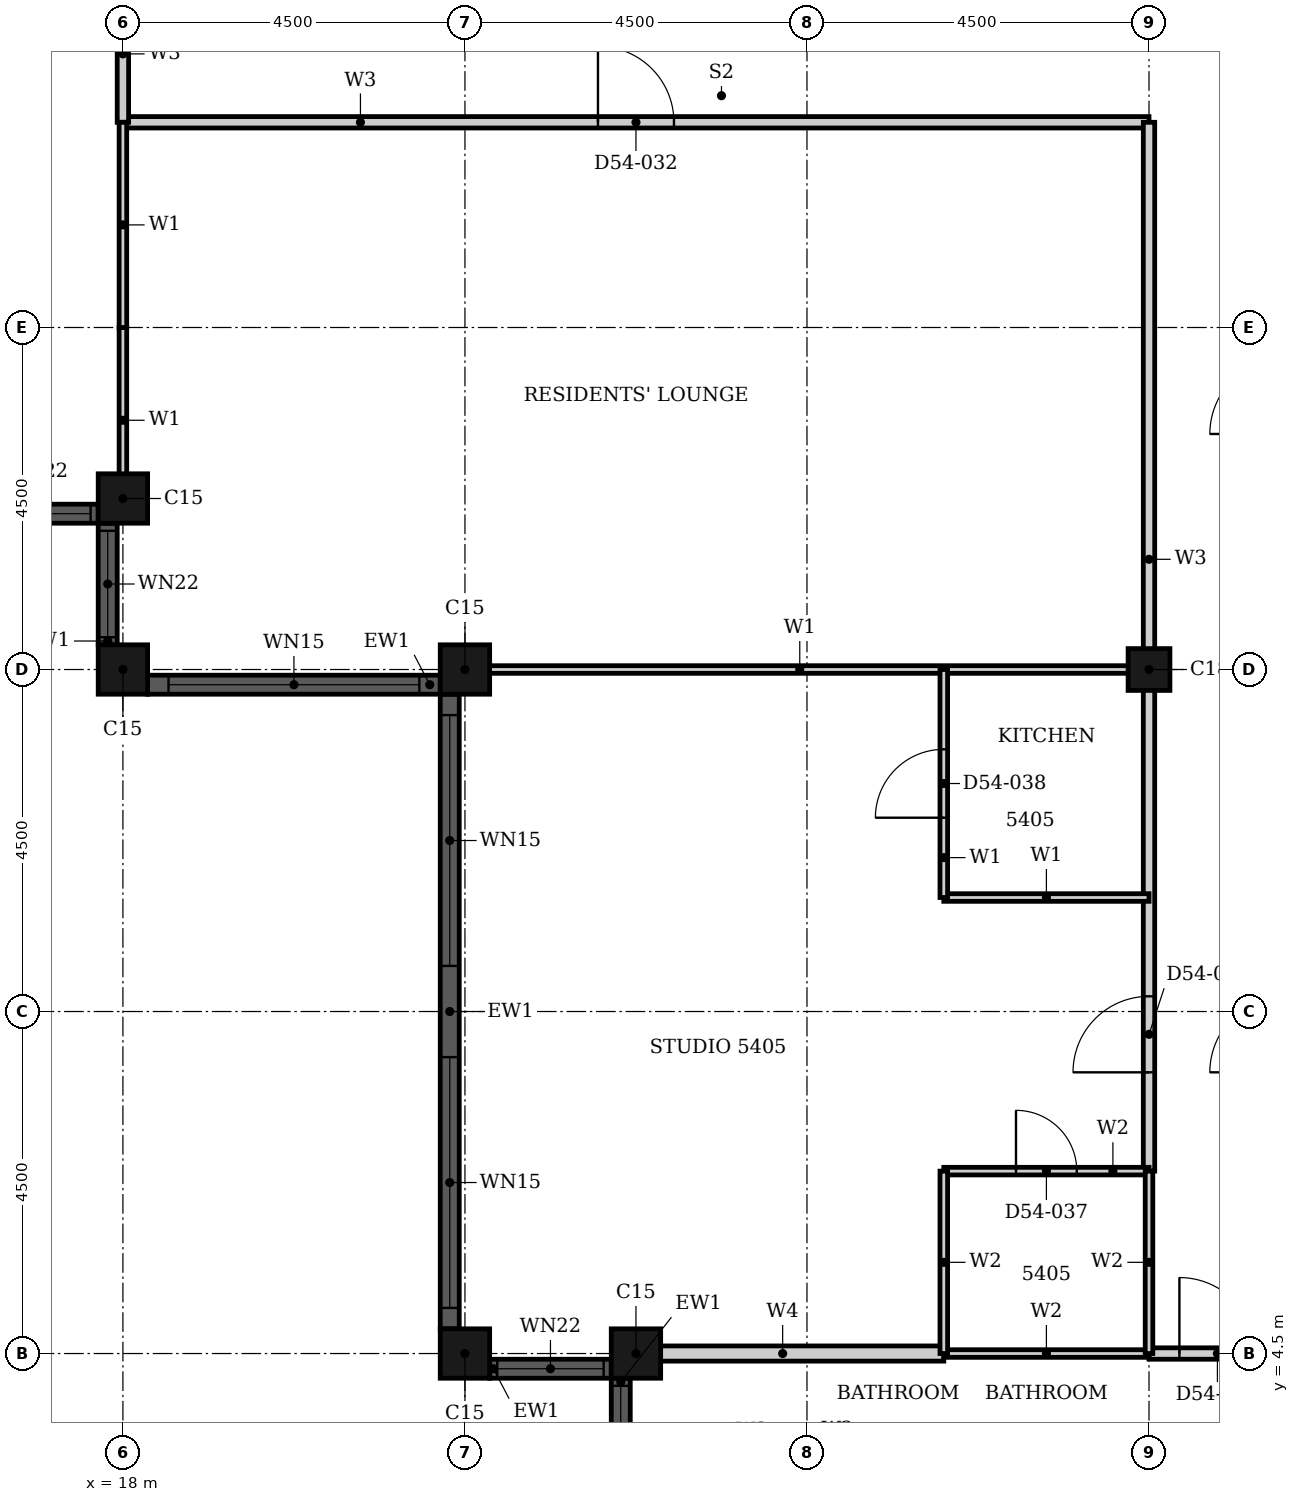
"""IFC4 building model, lengths in metres.
Left out: names, types, materials, properties, quantities, classifications, styles, units other than length and angle.
Written with IfcOpenShell. Run it as: python <this file> out.ifc"""

import sys

from ifc_helpers import new_model, si_unit, direction, frame, frame_2d, origin, origin_2d, place, context, subcontext, project, spatial, rectangle, hollow_rectangle, extrude, element, fill, save


model = new_model("IFC4")
c1 = context("Model", 3, precision=1e-05, world=origin(), true_north=direction((0.0, 1.0)))
c2 = subcontext(c1, "Body", "Model", "MODEL_VIEW")
j1 = project(units=[si_unit("LENGTHUNIT", "METRE"), si_unit("PLANEANGLEUNIT", "RADIAN")], contexts=[c1])
p1 = place(None, origin())
s1 = spatial("IfcSite", under=j1, at=p1, CompositionType="ELEMENT")
p2 = place(p1, origin())
s2 = spatial("IfcBuilding", under=s1, at=p2, CompositionType="ELEMENT")
p3 = place(p2, frame((0.0, 0.0, 214.6)))
s3 = spatial("IfcBuildingStorey", under=s2, at=p3, CompositionType="ELEMENT", Elevation=214.6)
for number, where, z_axis, x_axis in (
    (1, (18.0, 15.75, 0.0), (0.0, 0.0, 1.0), (1.0, 0.0, 0.0)),
    (2, (18.0, 13.5, 0.0), (0.0, 0.0, 1.0), (1.0, 0.0, 0.0)),
    (3, (22.5, 13.5, 0.0), (0.0, 0.0, 1.0), (1.0, 0.0, 0.0)),
    (4, (22.5, 4.5, 0.0), (0.0, 0.0, 1.0), (1.0, 0.0, 0.0)),
    (5, (24.75, 4.5, 0.0), (0.0, 0.0, 1.0), (1.0, 0.0, 0.0)),
):
    element("IfcColumn", number, at=place(p3, frame(where, z_axis=z_axis, x_axis=x_axis)), inside=s3, PredefinedType="COLUMN", context=c2, shape_type="SweptSolid", body=[
        extrude(hollow_rectangle(XDim=0.65, YDim=0.65, WallThickness=0.021, at=origin_2d()), origin(), (0.0, 0.0, 1.0), 3.7),
    ])
p4 = place(p3, frame((31.5, 13.5, 0.0), z_axis=(0.0, 0.0, 1.0), x_axis=(1.0, 0.0, 0.0)))
e6 = element("IfcColumn", 6, at=p4, inside=s3, PredefinedType="COLUMN", context=c2, shape_type="SweptSolid", body=[
    extrude(hollow_rectangle(XDim=0.55, YDim=0.55, WallThickness=0.018, at=origin_2d()), origin(), (0.0, 0.0, 1.0), 3.7),
])
p5 = place(p3, frame((16.075, 15.55, 0.0), z_axis=(0.0, 0.0, 1.0), x_axis=(1.0, 0.0, 0.0)))
e7 = element("IfcWall", 7, at=p5, inside=s3, PredefinedType="SOLIDWALL", context=c2, shape_type="SweptSolid", body=[
    extrude(rectangle(XDim=1.6, YDim=0.25, at=frame_2d((0.8, 0.0))), origin(), (0.0, 0.0, 1.0), 3.7),
])
p6 = place(p5, frame((0.1, 0.0, 0.9)))
e8 = element("IfcOpeningElement", 8, at=p6, cuts=e7, PredefinedType="OPENING", context=c2, shape_type="SweptSolid", body=[
    extrude(rectangle(XDim=1.4, YDim=1.85, at=frame_2d((0.7, 0.925))), frame((0.0, 0.135, 0.0), z_axis=(0.0, -1.0, 0.0), x_axis=(1.0, 0.0, 0.0)), (0.0, 0.0, 1.0), 0.27),
])
p7 = place(p3, frame((17.8, 15.425, 0.0), z_axis=(0.0, 0.0, 1.0), x_axis=(0.0, -1.0, 0.0)))
e9 = element("IfcWall", 9, at=p7, inside=s3, PredefinedType="SOLIDWALL", context=c2, shape_type="SweptSolid", body=[
    extrude(rectangle(XDim=1.6, YDim=0.25, at=frame_2d((0.8, 0.0))), origin(), (0.0, 0.0, 1.0), 3.7),
])
p8 = place(p7, frame((0.1, 0.0, 0.9)))
e10 = element("IfcOpeningElement", 10, at=p8, cuts=e9, PredefinedType="OPENING", context=c2, shape_type="SweptSolid", body=[
    extrude(rectangle(XDim=1.4, YDim=1.85, at=frame_2d((0.7, 0.925))), frame((0.0, 0.135, 0.0), z_axis=(0.0, -1.0, 0.0), x_axis=(1.0, 0.0, 0.0)), (0.0, 0.0, 1.0), 0.27),
])
p9 = place(p3, frame((18.325, 13.3, 0.0), z_axis=(0.0, 0.0, 1.0), x_axis=(1.0, 0.0, 0.0)))
e11 = element("IfcWall", 11, at=p9, inside=s3, PredefinedType="SOLIDWALL", context=c2, shape_type="SweptSolid", body=[
    extrude(rectangle(XDim=3.85, YDim=0.25, at=frame_2d((1.925, 0.0))), origin(), (0.0, 0.0, 1.0), 3.7),
])
p10 = place(p9, frame((0.275, 0.0, 0.45)))
e12 = element("IfcOpeningElement", 12, at=p10, cuts=e11, PredefinedType="OPENING", context=c2, shape_type="SweptSolid", body=[
    extrude(rectangle(XDim=3.3, YDim=2.3, at=frame_2d((1.65, 1.15))), frame((0.0, 0.135, 0.0), z_axis=(0.0, -1.0, 0.0), x_axis=(1.0, 0.0, 0.0)), (0.0, 0.0, 1.0), 0.27),
])
p11 = place(p3, frame((22.3, 13.175, 0.0), z_axis=(0.0, 0.0, 1.0), x_axis=(0.0, -1.0, 0.0)))
e13 = element("IfcWall", 13, at=p11, inside=s3, PredefinedType="SOLIDWALL", context=c2, shape_type="SweptSolid", body=[
    extrude(rectangle(XDim=8.35, YDim=0.25, at=frame_2d((4.175, 0.0))), origin(), (0.0, 0.0, 1.0), 3.7),
])
p12 = place(p11, frame((0.275, 0.0, 0.45)))
e14 = element("IfcOpeningElement", 14, at=p12, cuts=e13, PredefinedType="OPENING", context=c2, shape_type="SweptSolid", body=[
    extrude(rectangle(XDim=3.3, YDim=2.3, at=frame_2d((1.65, 1.15))), frame((0.0, 0.135, 0.0), z_axis=(0.0, -1.0, 0.0), x_axis=(1.0, 0.0, 0.0)), (0.0, 0.0, 1.0), 0.27),
])
p13 = place(p11, frame((4.775, 0.0, 0.45)))
e15 = element("IfcOpeningElement", 15, at=p13, cuts=e13, PredefinedType="OPENING", context=c2, shape_type="SweptSolid", body=[
    extrude(rectangle(XDim=3.3, YDim=2.3, at=frame_2d((1.65, 1.15))), frame((0.0, 0.135, 0.0), z_axis=(0.0, -1.0, 0.0), x_axis=(1.0, 0.0, 0.0)), (0.0, 0.0, 1.0), 0.27),
])
p14 = place(p3, frame((22.825, 4.3, 0.0), z_axis=(0.0, 0.0, 1.0), x_axis=(1.0, 0.0, 0.0)))
e16 = element("IfcWall", 16, at=p14, inside=s3, PredefinedType="SOLIDWALL", context=c2, shape_type="SweptSolid", body=[
    extrude(rectangle(XDim=1.6, YDim=0.25, at=frame_2d((0.8, 0.0))), origin(), (0.0, 0.0, 1.0), 3.7),
])
p15 = place(p14, frame((0.1, 0.0, 0.9)))
e17 = element("IfcOpeningElement", 17, at=p15, cuts=e16, PredefinedType="OPENING", context=c2, shape_type="SweptSolid", body=[
    extrude(rectangle(XDim=1.4, YDim=1.85, at=frame_2d((0.7, 0.925))), frame((0.0, 0.135, 0.0), z_axis=(0.0, -1.0, 0.0), x_axis=(1.0, 0.0, 0.0)), (0.0, 0.0, 1.0), 0.27),
])
p16 = place(p3, frame((24.55, 4.175, 0.0), z_axis=(0.0, 0.0, 1.0), x_axis=(0.0, -1.0, 0.0)))
e18 = element("IfcWall", 18, at=p16, inside=s3, PredefinedType="SOLIDWALL", context=c2, shape_type="SweptSolid", body=[
    extrude(rectangle(XDim=1.6, YDim=0.25, at=frame_2d((0.8, 0.0))), origin(), (0.0, 0.0, 1.0), 3.7),
])
p17 = place(p16, frame((0.1, 0.0, 0.9)))
e19 = element("IfcOpeningElement", 19, at=p17, cuts=e18, PredefinedType="OPENING", context=c2, shape_type="SweptSolid", body=[
    extrude(rectangle(XDim=1.4, YDim=1.85, at=frame_2d((0.7, 0.925))), frame((0.0, 0.135, 0.0), z_axis=(0.0, -1.0, 0.0), x_axis=(1.0, 0.0, 0.0)), (0.0, 0.0, 1.0), 0.27),
])
p18 = place(p3, frame((18.0, 20.7, 0.0), z_axis=(0.0, 0.0, 1.0), x_axis=(1.0, 0.0, 0.0)))
e20 = element("IfcWall", 20, at=p18, inside=s3, PredefinedType="PARTITIONING", context=c2, shape_type="SweptSolid", body=[
    extrude(rectangle(XDim=13.5, YDim=0.15, at=frame_2d((6.75, 0.0))), origin(), (0.0, 0.0, 1.0), 3.4),
])
p19 = place(p18, frame((6.25, 0.0, 0.0)))
e21 = element("IfcOpeningElement", 21, at=p19, cuts=e20, PredefinedType="OPENING", context=c2, shape_type="SweptSolid", body=[
    extrude(rectangle(XDim=1.0, YDim=2.1, at=frame_2d((0.5, 1.05))), frame((0.0, 0.085, 0.0), z_axis=(0.0, -1.0, 0.0), x_axis=(1.0, 0.0, 0.0)), (0.0, 0.0, 1.0), 0.17),
])
p20 = place(p3, frame((31.5, 4.5, 0.0), z_axis=(0.0, 0.0, 1.0), x_axis=(1.0, 0.0, 0.0)))
e22 = element("IfcWall", 22, at=p20, inside=s3, PredefinedType="PARTITIONING", context=c2, shape_type="SweptSolid", body=[
    extrude(rectangle(XDim=1.8, YDim=0.15, at=frame_2d((0.9, 0.0))), origin(), (0.0, 0.0, 1.0), 3.4),
])
p21 = place(p20, frame((0.4, 0.0, 0.0)))
e23 = element("IfcOpeningElement", 23, at=p21, cuts=e22, PredefinedType="OPENING", context=c2, shape_type="SweptSolid", body=[
    extrude(rectangle(XDim=1.0, YDim=2.2, at=frame_2d((0.5, 1.1))), frame((0.0, 0.085, 0.0), z_axis=(0.0, -1.0, 0.0), x_axis=(1.0, 0.0, 0.0)), (0.0, 0.0, 1.0), 0.17),
])
p22 = place(p3, frame((18.0, 20.7, 0.0), z_axis=(0.0, 0.0, 1.0), x_axis=(0.0, 1.0, 0.0)))
e24 = element("IfcWall", 24, at=p22, inside=s3, PredefinedType="PARTITIONING", context=c2, shape_type="SweptSolid", body=[
    extrude(rectangle(XDim=1.8, YDim=0.15, at=frame_2d((0.9, 0.0))), origin(), (0.0, 0.0, 1.0), 3.4),
])
p23 = place(p3, frame((31.5, 6.9, 0.0), z_axis=(0.0, 0.0, 1.0), x_axis=(0.0, 1.0, 0.0)))
e25 = element("IfcWall", 25, at=p23, inside=s3, PredefinedType="PARTITIONING", context=c2, shape_type="SweptSolid", body=[
    extrude(rectangle(XDim=13.8, YDim=0.15, at=frame_2d((6.9, 0.0))), origin(), (0.0, 0.0, 1.0), 2.68),
])
p24 = place(p23, frame((1.3, 0.0, 0.0)))
e26 = element("IfcOpeningElement", 26, at=p24, cuts=e25, PredefinedType="OPENING", context=c2, shape_type="SweptSolid", body=[
    extrude(rectangle(XDim=1.0, YDim=2.2, at=frame_2d((0.5, 1.1))), frame((0.0, 0.085, 0.0), z_axis=(0.0, -1.0, 0.0), x_axis=(1.0, 0.0, 0.0)), (0.0, 0.0, 1.0), 0.17),
])
p25 = place(p3, frame((28.8, 10.5, 0.0), z_axis=(0.0, 0.0, 1.0), x_axis=(1.0, 0.0, 0.0)))
e27 = element("IfcWall", 27, at=p25, inside=s3, PredefinedType="PARTITIONING", context=c2, shape_type="SweptSolid", body=[
    extrude(rectangle(XDim=2.7, YDim=0.1, at=frame_2d((1.35, 0.0))), origin(), (0.0, 0.0, 1.0), 3.4),
])
p26 = place(p3, frame((22.31, 13.5, 0.0), z_axis=(0.0, 0.0, 1.0), x_axis=(1.0, 0.0, 0.0)))
e28 = element("IfcWall", 28, at=p26, inside=s3, PredefinedType="PARTITIONING", context=c2, shape_type="SweptSolid", body=[
    extrude(rectangle(XDim=9.19, YDim=0.1, at=frame_2d((4.595, 0.0))), origin(), (0.0, 0.0, 1.0), 2.48),
])
p27 = place(p3, frame((18.0, 15.56, 0.0), z_axis=(0.0, 0.0, 1.0), x_axis=(0.0, 1.0, 0.0)))
e29 = element("IfcWall", 29, at=p27, inside=s3, PredefinedType="PARTITIONING", context=c2, shape_type="SweptSolid", body=[
    extrude(rectangle(XDim=2.439, YDim=0.1, at=frame_2d((1.219, 0.0))), origin(), (0.0, 0.0, 1.0), 3.4),
])
p28 = place(p3, frame((18.0, 18.0, 0.0), z_axis=(0.0, 0.0, 1.0), x_axis=(0.0, 1.0, 0.0)))
e30 = element("IfcWall", 30, at=p28, inside=s3, PredefinedType="PARTITIONING", context=c2, shape_type="SweptSolid", body=[
    extrude(rectangle(XDim=2.7, YDim=0.1, at=frame_2d((1.35, 0.0))), origin(), (0.0, 0.0, 1.0), 3.4),
])
p29 = place(p3, frame((28.8, 10.5, 0.0), z_axis=(0.0, 0.0, 1.0), x_axis=(0.0, 1.0, 0.0)))
e31 = element("IfcWall", 31, at=p29, inside=s3, PredefinedType="PARTITIONING", context=c2, shape_type="SweptSolid", body=[
    extrude(rectangle(XDim=3.0, YDim=0.1, at=frame_2d((1.5, 0.0))), origin(), (0.0, 0.0, 1.0), 3.4),
])
p30 = place(p29, frame((1.05, 0.0, 0.0)))
e32 = element("IfcOpeningElement", 32, at=p30, cuts=e31, PredefinedType="OPENING", context=c2, shape_type="SweptSolid", body=[
    extrude(rectangle(XDim=0.9, YDim=2.1, at=frame_2d((0.45, 1.05))), frame((0.0, 0.06, 0.0), z_axis=(0.0, -1.0, 0.0), x_axis=(1.0, 0.0, 0.0)), (0.0, 0.0, 1.0), 0.12),
])
p31 = place(p3, frame((24.56, 4.5, 0.0), z_axis=(0.0, 0.0, 1.0), x_axis=(1.0, 0.0, 0.0)))
e33 = element("IfcWall", 33, at=p31, inside=s3, PredefinedType="PARTITIONING", context=c2, shape_type="SweptSolid", body=[
    extrude(rectangle(XDim=4.24, YDim=0.2, at=frame_2d((2.12, 0.0))), origin(), (0.0, 0.0, 1.0), 3.4),
])
p32 = place(p3, frame((28.8, 4.5, 0.0), z_axis=(0.0, 0.0, 1.0), x_axis=(1.0, 0.0, 0.0)))
e34 = element("IfcWall", 34, at=p32, inside=s3, PredefinedType="PARTITIONING", context=c2, shape_type="SweptSolid", body=[
    extrude(rectangle(XDim=2.7, YDim=0.1, at=frame_2d((1.35, 0.0))), origin(), (0.0, 0.0, 1.0), 3.4),
])
p33 = place(p3, frame((28.8, 6.9, 0.0), z_axis=(0.0, 0.0, 1.0), x_axis=(1.0, 0.0, 0.0)))
e35 = element("IfcWall", 35, at=p33, inside=s3, PredefinedType="PARTITIONING", context=c2, shape_type="SweptSolid", body=[
    extrude(rectangle(XDim=2.7, YDim=0.1, at=frame_2d((1.35, 0.0))), origin(), (0.0, 0.0, 1.0), 3.4),
])
p34 = place(p33, frame((0.95, 0.0, 0.0)))
e36 = element("IfcOpeningElement", 36, at=p34, cuts=e35, PredefinedType="OPENING", context=c2, shape_type="SweptSolid", body=[
    extrude(rectangle(XDim=0.8, YDim=2.1, at=frame_2d((0.4, 1.05))), frame((0.0, 0.06, 0.0), z_axis=(0.0, -1.0, 0.0), x_axis=(1.0, 0.0, 0.0)), (0.0, 0.0, 1.0), 0.12),
])
p35 = place(p3, frame((28.8, 4.5, 0.0), z_axis=(0.0, 0.0, 1.0), x_axis=(0.0, 1.0, 0.0)))
e37 = element("IfcWall", 37, at=p35, inside=s3, PredefinedType="PARTITIONING", context=c2, shape_type="SweptSolid", body=[
    extrude(rectangle(XDim=2.4, YDim=0.1, at=frame_2d((1.2, 0.0))), origin(), (0.0, 0.0, 1.0), 3.4),
])
p36 = place(p3, frame((31.5, 4.5, 0.0), z_axis=(0.0, 0.0, 1.0), x_axis=(0.0, 1.0, 0.0)))
e38 = element("IfcWall", 38, at=p36, inside=s3, PredefinedType="PARTITIONING", context=c2, shape_type="SweptSolid", body=[
    extrude(rectangle(XDim=2.4, YDim=0.1, at=frame_2d((1.2, 0.0))), origin(), (0.0, 0.0, 1.0), 2.68),
])
p37 = place(p6, origin())
e39 = element("IfcWindow", 39, at=p37, inside=s3, PartitioningType="SINGLE_PANEL", PredefinedType="WINDOW", context=c2, shape_type="SweptSolid", body=[
    extrude(rectangle(XDim=1.4, YDim=1.85, at=frame_2d((0.7, 0.925))), frame((0.0, 0.03, 0.0), z_axis=(0.0, -1.0, 0.0), x_axis=(1.0, 0.0, 0.0)), (0.0, 0.0, 1.0), 0.06),
])
fill(e8, e39)
p38 = place(p8, origin())
e40 = element("IfcWindow", 40, at=p38, inside=s3, PartitioningType="SINGLE_PANEL", PredefinedType="WINDOW", context=c2, shape_type="SweptSolid", body=[
    extrude(rectangle(XDim=1.4, YDim=1.85, at=frame_2d((0.7, 0.925))), frame((0.0, 0.03, 0.0), z_axis=(0.0, -1.0, 0.0), x_axis=(1.0, 0.0, 0.0)), (0.0, 0.0, 1.0), 0.06),
])
fill(e10, e40)
p39 = place(p10, origin())
e41 = element("IfcWindow", 41, at=p39, inside=s3, PartitioningType="SINGLE_PANEL", PredefinedType="WINDOW", context=c2, shape_type="SweptSolid", body=[
    extrude(rectangle(XDim=3.3, YDim=2.3, at=frame_2d((1.65, 1.15))), frame((0.0, 0.03, 0.0), z_axis=(0.0, -1.0, 0.0), x_axis=(1.0, 0.0, 0.0)), (0.0, 0.0, 1.0), 0.06),
])
fill(e12, e41)
p40 = place(p12, origin())
e42 = element("IfcWindow", 42, at=p40, inside=s3, PartitioningType="SINGLE_PANEL", PredefinedType="WINDOW", context=c2, shape_type="SweptSolid", body=[
    extrude(rectangle(XDim=3.3, YDim=2.3, at=frame_2d((1.65, 1.15))), frame((0.0, 0.03, 0.0), z_axis=(0.0, -1.0, 0.0), x_axis=(1.0, 0.0, 0.0)), (0.0, 0.0, 1.0), 0.06),
])
fill(e14, e42)
p41 = place(p13, origin())
e43 = element("IfcWindow", 43, at=p41, inside=s3, PartitioningType="SINGLE_PANEL", PredefinedType="WINDOW", context=c2, shape_type="SweptSolid", body=[
    extrude(rectangle(XDim=3.3, YDim=2.3, at=frame_2d((1.65, 1.15))), frame((0.0, 0.03, 0.0), z_axis=(0.0, -1.0, 0.0), x_axis=(1.0, 0.0, 0.0)), (0.0, 0.0, 1.0), 0.06),
])
fill(e15, e43)
p42 = place(p15, origin())
e44 = element("IfcWindow", 44, at=p42, inside=s3, PartitioningType="SINGLE_PANEL", PredefinedType="WINDOW", context=c2, shape_type="SweptSolid", body=[
    extrude(rectangle(XDim=1.4, YDim=1.85, at=frame_2d((0.7, 0.925))), frame((0.0, 0.03, 0.0), z_axis=(0.0, -1.0, 0.0), x_axis=(1.0, 0.0, 0.0)), (0.0, 0.0, 1.0), 0.06),
])
fill(e17, e44)
p43 = place(p17, origin())
e45 = element("IfcWindow", 45, at=p43, inside=s3, PartitioningType="SINGLE_PANEL", PredefinedType="WINDOW", context=c2, shape_type="SweptSolid", body=[
    extrude(rectangle(XDim=1.4, YDim=1.85, at=frame_2d((0.7, 0.925))), frame((0.0, 0.03, 0.0), z_axis=(0.0, -1.0, 0.0), x_axis=(1.0, 0.0, 0.0)), (0.0, 0.0, 1.0), 0.06),
])
fill(e19, e45)
p44 = place(p19, origin())
e46 = element("IfcDoor", 46, at=p44, inside=s3, OperationType="SINGLE_SWING_RIGHT", PredefinedType="DOOR", context=c2, shape_type="SweptSolid", body=[
    extrude(rectangle(XDim=1.0, YDim=2.1, at=frame_2d((0.5, 1.05))), frame((0.0, 0.025, 0.0), z_axis=(0.0, -1.0, 0.0), x_axis=(1.0, 0.0, 0.0)), (0.0, 0.0, 1.0), 0.05),
])
fill(e21, e46)
p45 = place(p24, origin())
e47 = element("IfcDoor", 47, at=p45, inside=s3, OperationType="SINGLE_SWING_LEFT", PredefinedType="DOOR", context=c2, shape_type="SweptSolid", body=[
    extrude(rectangle(XDim=1.0, YDim=2.2, at=frame_2d((0.5, 1.1))), frame((0.0, 0.025, 0.0), z_axis=(0.0, -1.0, 0.0), x_axis=(1.0, 0.0, 0.0)), (0.0, 0.0, 1.0), 0.05),
])
fill(e26, e47)
p46 = place(p34, origin())
e48 = element("IfcDoor", 48, at=p46, inside=s3, OperationType="SINGLE_SWING_RIGHT", PredefinedType="DOOR", context=c2, shape_type="SweptSolid", body=[
    extrude(rectangle(XDim=0.8, YDim=2.1, at=frame_2d((0.4, 1.05))), frame((0.0, 0.025, 0.0), z_axis=(0.0, -1.0, 0.0), x_axis=(1.0, 0.0, 0.0)), (0.0, 0.0, 1.0), 0.05),
])
fill(e36, e48)
p47 = place(p30, origin())
e49 = element("IfcDoor", 49, at=p47, inside=s3, OperationType="SINGLE_SWING_RIGHT", PredefinedType="DOOR", context=c2, shape_type="SweptSolid", body=[
    extrude(rectangle(XDim=0.9, YDim=2.1, at=frame_2d((0.45, 1.05))), frame((0.0, 0.025, 0.0), z_axis=(0.0, -1.0, 0.0), x_axis=(1.0, 0.0, 0.0)), (0.0, 0.0, 1.0), 0.05),
])
fill(e32, e49)
p48 = place(p21, origin())
e50 = element("IfcDoor", 50, at=p48, inside=s3, OperationType="SINGLE_SWING_RIGHT", PredefinedType="DOOR", context=c2, shape_type="SweptSolid", body=[
    extrude(rectangle(XDim=1.0, YDim=2.2, at=frame_2d((0.5, 1.1))), frame((0.0, 0.025, 0.0), z_axis=(0.0, -1.0, 0.0), x_axis=(1.0, 0.0, 0.0)), (0.0, 0.0, 1.0), 0.05),
])
fill(e23, e50)
save(model, sys.argv[1])
